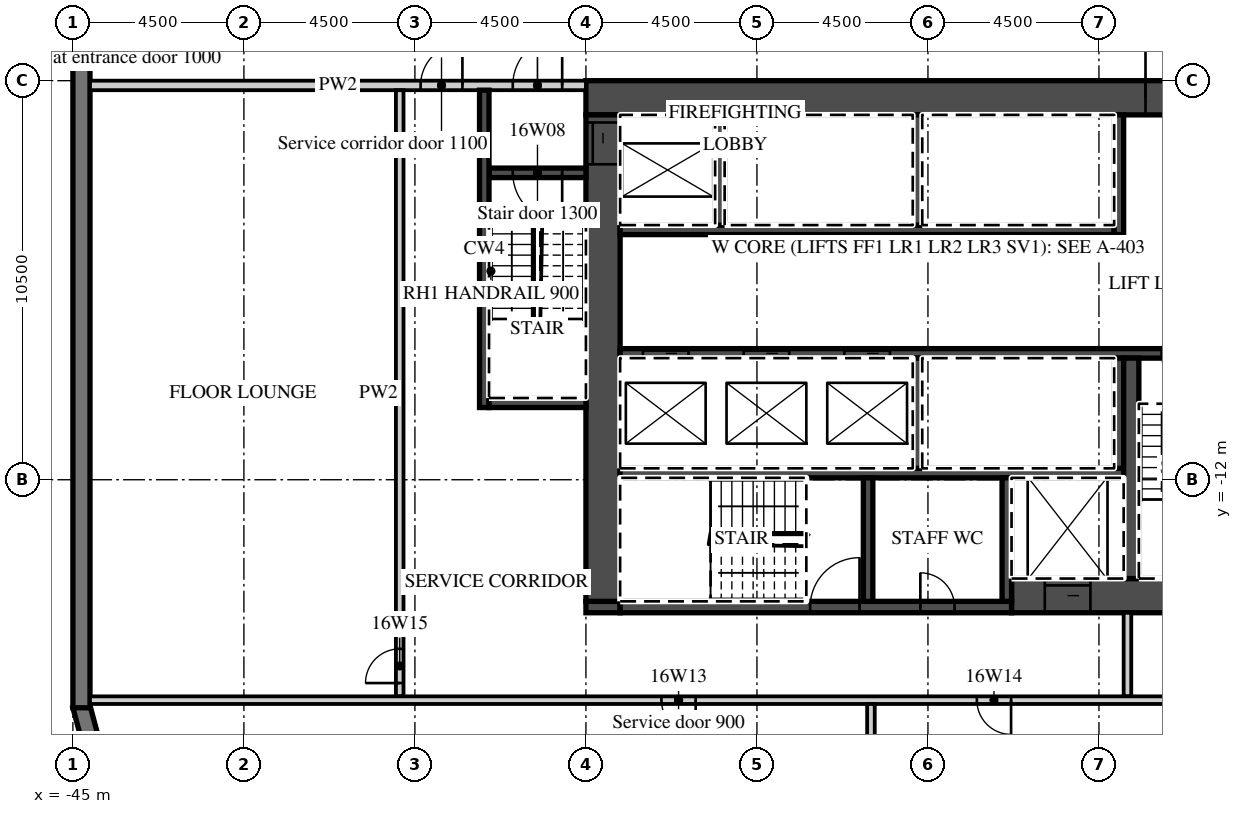
"""IFC4 building model, lengths in metres.
Left out: names, types, materials, properties, quantities, classifications, styles, units other than length and angle.
Written with IfcOpenShell. Run it as: python <this file> out.ifc"""

import sys

from ifc_helpers import new_model, si_unit, direction, frame, frame_2d, origin, place, context, subcontext, project, spatial, polyline, rectangle, outline, extrude, element, fill, save


model = new_model("IFC4")
c1 = context("Model", 3, precision=1e-05, world=origin(), true_north=direction((0.0, 1.0)))
c2 = subcontext(c1, "Body", "Model", "MODEL_VIEW")
j1 = project(units=[si_unit("LENGTHUNIT", "METRE"), si_unit("PLANEANGLEUNIT", "RADIAN")], contexts=[c1])
p1 = place(None, origin())
s1 = spatial("IfcSite", under=j1, at=p1, CompositionType="ELEMENT")
p2 = place(p1, origin())
s2 = spatial("IfcBuilding", under=s1, at=p2, CompositionType="ELEMENT")
p3 = place(p2, frame((0.0, 0.0, 83.1)))
s3 = spatial("IfcBuildingStorey", under=s2, at=p3, CompositionType="ELEMENT", Elevation=83.1)
p4 = place(p3, frame((-44.783, -17.942, 0.0), z_axis=(0.0, 0.0, 1.0), x_axis=(0.25881466832, -0.965926999034, 0.0)))
e1 = element("IfcWall", 1, at=p4, inside=s3, PredefinedType="SOLIDWALL", context=c2, shape_type="SweptSolid", body=[
    extrude(outline(polyline([(0.0, -0.225), (2.071, -0.225), (1.95, 0.225), (0.121, 0.225), (0.0, -0.225)])), origin(), (0.0, 0.0, 1.0), 3.02),
])
p5 = place(p3, frame((-44.775, 18.0, 0.0), z_axis=(0.0, 0.0, 1.0), x_axis=(0.0, -1.0, 0.0)))
e2 = element("IfcWall", 2, at=p5, inside=s3, PredefinedType="SOLIDWALL", context=c2, shape_type="SweptSolid", body=[
    extrude(rectangle(XDim=36.0, YDim=0.45, at=frame_2d((18.0, 0.0))), origin(), (0.0, 0.0, 1.0), 3.02),
])
p6 = place(p5, frame((3.9, 0.0, 0.45)))
e3 = element("IfcOpeningElement", 3, at=p6, cuts=e2, PredefinedType="OPENING", context=c2, shape_type="SweptSolid", body=[
    extrude(rectangle(XDim=3.3, YDim=2.25, at=frame_2d((1.65, 1.125))), frame((0.0, 0.235, 0.0), z_axis=(0.0, -1.0, 0.0), x_axis=(1.0, 0.0, 0.0)), (0.0, 0.0, 1.0), 0.47),
])
p7 = place(p5, frame((8.4, 0.0, 0.45)))
e4 = element("IfcOpeningElement", 4, at=p7, cuts=e2, PredefinedType="OPENING", context=c2, shape_type="SweptSolid", body=[
    extrude(rectangle(XDim=3.3, YDim=2.25, at=frame_2d((1.65, 1.125))), frame((0.0, 0.235, 0.0), z_axis=(0.0, -1.0, 0.0), x_axis=(1.0, 0.0, 0.0)), (0.0, 0.0, 1.0), 0.47),
])
p8 = place(p5, frame((12.9, 0.0, 0.45)))
e5 = element("IfcOpeningElement", 5, at=p8, cuts=e2, PredefinedType="OPENING", context=c2, shape_type="SweptSolid", body=[
    extrude(rectangle(XDim=3.3, YDim=2.25, at=frame_2d((1.65, 1.125))), frame((0.0, 0.235, 0.0), z_axis=(0.0, -1.0, 0.0), x_axis=(1.0, 0.0, 0.0)), (0.0, 0.0, 1.0), 0.47),
])
p9 = place(p3, frame((-31.5, -1.95, 0.0), z_axis=(0.0, 0.0, 1.0), x_axis=(1.0, 0.0, 0.0)))
e6 = element("IfcWall", 6, at=p9, inside=s3, PredefinedType="SHEAR", context=c2, shape_type="SweptSolid", body=[
    extrude(rectangle(XDim=18.0, YDim=0.9, at=frame_2d((9.0, 0.0))), origin(), (0.0, 0.0, 1.0), 3.02),
])
p10 = place(p9, frame((14.725, 0.0, 0.0)))
e7 = element("IfcOpeningElement", 7, at=p10, cuts=e6, PredefinedType="OPENING", context=c2, shape_type="SweptSolid", body=[
    extrude(rectangle(XDim=1.8, YDim=2.1, at=frame_2d((0.9, 1.05))), frame((0.0, 0.46, 0.0), z_axis=(0.0, -1.0, 0.0), x_axis=(1.0, 0.0, 0.0)), (0.0, 0.0, 1.0), 0.92),
])
p11 = place(p3, frame((-20.3, -15.05, 0.0), z_axis=(0.0, 0.0, 1.0), x_axis=(1.0, 0.0, 0.0)))
e8 = element("IfcWall", 8, at=p11, inside=s3, PredefinedType="SHEAR", context=c2, shape_type="SweptSolid", body=[
    extrude(rectangle(XDim=6.8, YDim=0.9, at=frame_2d((3.4, 0.0))), origin(), (0.0, 0.0, 1.0), 3.02),
])
p12 = place(p11, frame((0.875, 0.0, 0.0)))
e9 = element("IfcOpeningElement", 9, at=p12, cuts=e8, PredefinedType="OPENING", context=c2, shape_type="SweptSolid", body=[
    extrude(rectangle(XDim=1.2, YDim=2.1, at=frame_2d((0.6, 1.05))), frame((0.0, 0.46, 0.0), z_axis=(0.0, -1.0, 0.0), x_axis=(1.0, 0.0, 0.0)), (0.0, 0.0, 1.0), 0.92),
])
p13 = place(p3, frame((-31.5, -15.35, 0.0), z_axis=(0.0, 0.0, 1.0), x_axis=(1.0, 0.0, 0.0)))
e10 = element("IfcWall", 10, at=p13, inside=s3, PredefinedType="SHEAR", context=c2, shape_type="SweptSolid", body=[
    extrude(rectangle(XDim=0.9, YDim=0.3, at=frame_2d((0.45, 0.0))), origin(), (0.0, 0.0, 1.0), 3.02),
])
p14 = place(p3, frame((-30.6, -15.35, 0.0), z_axis=(0.0, 0.0, 1.0), x_axis=(1.0, 0.0, 0.0)))
e11 = element("IfcWall", 11, at=p14, inside=s3, PredefinedType="SHEAR", context=c2, shape_type="SweptSolid", body=[
    extrude(rectangle(XDim=10.3, YDim=0.3, at=frame_2d((5.15, 0.0))), origin(), (0.0, 0.0, 1.0), 3.02),
])
p15 = place(p14, frame((5.0, 0.0, 0.0)))
e12 = element("IfcOpeningElement", 12, at=p15, cuts=e11, PredefinedType="OPENING", context=c2, shape_type="SweptSolid", body=[
    extrude(rectangle(XDim=1.3, YDim=2.1, at=frame_2d((0.65, 1.05))), frame((0.0, 0.16, 0.0), z_axis=(0.0, -1.0, 0.0), x_axis=(1.0, 0.0, 0.0)), (0.0, 0.0, 1.0), 0.32),
])
p16 = place(p14, frame((7.9, 0.0, 0.0)))
e13 = element("IfcOpeningElement", 13, at=p16, cuts=e11, PredefinedType="OPENING", context=c2, shape_type="SweptSolid", body=[
    extrude(rectangle(XDim=0.9, YDim=2.1, at=frame_2d((0.45, 1.05))), frame((0.0, 0.16, 0.0), z_axis=(0.0, -1.0, 0.0), x_axis=(1.0, 0.0, 0.0)), (0.0, 0.0, 1.0), 0.32),
])
p17 = place(p3, frame((-31.05, -15.2, 0.0), z_axis=(0.0, 0.0, 1.0), x_axis=(0.0, 1.0, 0.0)))
e14 = element("IfcWall", 14, at=p17, inside=s3, PredefinedType="SHEAR", context=c2, shape_type="SweptSolid", body=[
    extrude(rectangle(XDim=12.8, YDim=0.9, at=frame_2d((6.4, 0.0))), origin(), (0.0, 0.0, 1.0), 3.02),
])
p18 = place(p17, frame((11.5, 0.0, 0.0)))
e15 = element("IfcOpeningElement", 15, at=p18, cuts=e14, PredefinedType="OPENING", context=c2, shape_type="SweptSolid", body=[
    extrude(rectangle(XDim=1.1, YDim=2.1, at=frame_2d((0.55, 1.05))), frame((0.0, 0.46, 0.0), z_axis=(0.0, -1.0, 0.0), x_axis=(1.0, 0.0, 0.0)), (0.0, 0.0, 1.0), 0.92),
])
p19 = place(p3, frame((-30.6, -5.425, 0.0), z_axis=(0.0, 0.0, 1.0), x_axis=(1.0, 0.0, 0.0)))
e16 = element("IfcWall", 16, at=p19, inside=s3, PredefinedType="SHEAR", context=c2, shape_type="SweptSolid", body=[
    extrude(rectangle(XDim=13.0, YDim=0.25, at=frame_2d((6.5, 0.0))), origin(), (0.0, 0.0, 1.0), 3.02),
])
p20 = place(p3, frame((-17.475, -5.55, 0.0), z_axis=(0.0, 0.0, 1.0), x_axis=(0.0, 1.0, 0.0)))
e17 = element("IfcWall", 17, at=p20, inside=s3, PredefinedType="SHEAR", context=c2, shape_type="SweptSolid", body=[
    extrude(rectangle(XDim=3.15, YDim=0.25, at=frame_2d((1.575, 0.0))), origin(), (0.0, 0.0, 1.0), 3.02),
])
for number, where, z_axis, x_axis in (
    (18, (-27.975, -5.3, 0.0), (0.0, 0.0, 1.0), (0.0, 1.0, 0.0)),
    (19, (-22.775, -5.3, 0.0), (0.0, 0.0, 1.0), (0.0, 1.0, 0.0)),
):
    element("IfcWall", number, at=place(p3, frame(where, z_axis=z_axis, x_axis=x_axis)), inside=s3, PredefinedType="SHEAR", context=c2, shape_type="SweptSolid", body=[
        extrude(rectangle(XDim=2.9, YDim=0.25, at=frame_2d((1.45, 0.0))), origin(), (0.0, 0.0, 1.0), 3.02),
    ])
p21 = place(p3, frame((-30.6, -8.675, 0.0), z_axis=(0.0, 0.0, 1.0), x_axis=(1.0, 0.0, 0.0)))
e20 = element("IfcWall", 20, at=p21, inside=s3, PredefinedType="SHEAR", context=c2, shape_type="SweptSolid", body=[
    extrude(rectangle(XDim=16.2, YDim=0.25, at=frame_2d((8.1, 0.0))), origin(), (0.0, 0.0, 1.0), 3.02),
])
p22 = place(p21, frame((0.6, 0.0, 0.0)))
e21 = element("IfcOpeningElement", 21, at=p22, cuts=e20, PredefinedType="OPENING", context=c2, shape_type="SweptSolid", body=[
    extrude(rectangle(XDim=1.2, YDim=2.1, at=frame_2d((0.6, 1.05))), frame((0.0, 0.135, 0.0), z_axis=(0.0, -1.0, 0.0), x_axis=(1.0, 0.0, 0.0)), (0.0, 0.0, 1.0), 0.27),
])
p23 = place(p21, frame((3.25, 0.0, 0.0)))
e22 = element("IfcOpeningElement", 22, at=p23, cuts=e20, PredefinedType="OPENING", context=c2, shape_type="SweptSolid", body=[
    extrude(rectangle(XDim=1.2, YDim=2.1, at=frame_2d((0.6, 1.05))), frame((0.0, 0.135, 0.0), z_axis=(0.0, -1.0, 0.0), x_axis=(1.0, 0.0, 0.0)), (0.0, 0.0, 1.0), 0.27),
])
p24 = place(p21, frame((5.9, 0.0, 0.0)))
e23 = element("IfcOpeningElement", 23, at=p24, cuts=e20, PredefinedType="OPENING", context=c2, shape_type="SweptSolid", body=[
    extrude(rectangle(XDim=1.2, YDim=2.1, at=frame_2d((0.6, 1.05))), frame((0.0, 0.135, 0.0), z_axis=(0.0, -1.0, 0.0), x_axis=(1.0, 0.0, 0.0)), (0.0, 0.0, 1.0), 0.27),
])
p25 = place(p21, frame((14.25, 0.0, 0.0)))
e24 = element("IfcOpeningElement", 24, at=p25, cuts=e20, PredefinedType="OPENING", context=c2, shape_type="SweptSolid", body=[
    extrude(rectangle(XDim=1.3, YDim=2.1, at=frame_2d((0.65, 1.05))), frame((0.0, 0.135, 0.0), z_axis=(0.0, -1.0, 0.0), x_axis=(1.0, 0.0, 0.0)), (0.0, 0.0, 1.0), 0.27),
])
p26 = place(p3, frame((-30.6, -11.825, 0.0), z_axis=(0.0, 0.0, 1.0), x_axis=(1.0, 0.0, 0.0)))
e25 = element("IfcWall", 25, at=p26, inside=s3, PredefinedType="SHEAR", context=c2, shape_type="SweptSolid", body=[
    extrude(rectangle(XDim=13.25, YDim=0.25, at=frame_2d((6.625, 0.0))), origin(), (0.0, 0.0, 1.0), 3.02),
])
for number, where, z_axis, x_axis in (
    (26, (-17.475, -11.7, 0.0), (0.0, 0.0, 1.0), (0.0, 1.0, 0.0)),
    (27, (-22.775, -11.7, 0.0), (0.0, 0.0, 1.0), (0.0, 1.0, 0.0)),
):
    element("IfcWall", number, at=place(p3, frame(where, z_axis=z_axis, x_axis=x_axis)), inside=s3, PredefinedType="SHEAR", context=c2, shape_type="SweptSolid", body=[
        extrude(rectangle(XDim=2.9, YDim=0.25, at=frame_2d((1.45, 0.0))), origin(), (0.0, 0.0, 1.0), 3.02),
    ])
p27 = place(p3, frame((-17.15, -14.6, 0.0), z_axis=(0.0, 0.0, 1.0), x_axis=(0.0, 1.0, 0.0)))
e28 = element("IfcWall", 28, at=p27, inside=s3, PredefinedType="SHEAR", context=c2, shape_type="SweptSolid", body=[
    extrude(rectangle(XDim=5.8, YDim=0.4, at=frame_2d((2.9, 0.0))), origin(), (0.0, 0.0, 1.0), 3.02),
])
for number, where, z_axis, x_axis in (
    (29, (-20.425, -15.2, 0.0), (0.0, 0.0, 1.0), (0.0, 1.0, 0.0)),
    (30, (-24.075, -15.2, 0.0), (0.0, 0.0, 1.0), (0.0, 1.0, 0.0)),
):
    element("IfcWall", number, at=place(p3, frame(where, z_axis=z_axis, x_axis=x_axis)), inside=s3, PredefinedType="SHEAR", context=c2, shape_type="SweptSolid", body=[
        extrude(rectangle(XDim=3.25, YDim=0.25, at=frame_2d((1.625, 0.0))), origin(), (0.0, 0.0, 1.0), 3.02),
    ])
p28 = place(p3, frame((-44.55, -1.625, 0.0), z_axis=(0.0, 0.0, 1.0), x_axis=(1.0, 0.0, 0.0)))
e31 = element("IfcWall", 31, at=p28, inside=s3, PredefinedType="PARTITIONING", context=c2, shape_type="SweptSolid", body=[
    extrude(rectangle(XDim=13.05, YDim=0.25, at=frame_2d((6.525, 0.0))), origin(), (0.0, 0.0, 1.0), 3.02),
])
p29 = place(p28, frame((11.125, 0.0, 0.0)))
e32 = element("IfcOpeningElement", 32, at=p29, cuts=e31, PredefinedType="OPENING", context=c2, shape_type="SweptSolid", body=[
    extrude(rectangle(XDim=1.3, YDim=2.1, at=frame_2d((0.65, 1.05))), frame((0.0, 0.135, 0.0), z_axis=(0.0, -1.0, 0.0), x_axis=(1.0, 0.0, 0.0)), (0.0, 0.0, 1.0), 0.27),
])
p30 = place(p28, frame((8.7, 0.0, 0.0)))
e33 = element("IfcOpeningElement", 33, at=p30, cuts=e31, PredefinedType="OPENING", context=c2, shape_type="SweptSolid", body=[
    extrude(rectangle(XDim=1.1, YDim=2.1, at=frame_2d((0.55, 1.05))), frame((0.0, 0.135, 0.0), z_axis=(0.0, -1.0, 0.0), x_axis=(1.0, 0.0, 0.0)), (0.0, 0.0, 1.0), 0.27),
])
p31 = place(p3, frame((-34.05, -3.925, 0.0), z_axis=(0.0, 0.0, 1.0), x_axis=(1.0, 0.0, 0.0)))
e34 = element("IfcWall", 34, at=p31, inside=s3, PredefinedType="SHEAR", context=c2, shape_type="SweptSolid", body=[
    extrude(rectangle(XDim=2.55, YDim=0.25, at=frame_2d((1.275, 0.0))), origin(), (0.0, 0.0, 1.0), 3.02),
])
p32 = place(p31, frame((0.625, 0.0, 0.0)))
e35 = element("IfcOpeningElement", 35, at=p32, cuts=e34, PredefinedType="OPENING", context=c2, shape_type="SweptSolid", body=[
    extrude(rectangle(XDim=1.3, YDim=2.1, at=frame_2d((0.65, 1.05))), frame((0.0, 0.135, 0.0), z_axis=(0.0, -1.0, 0.0), x_axis=(1.0, 0.0, 0.0)), (0.0, 0.0, 1.0), 0.27),
])
p33 = place(p3, frame((-34.175, -10.1, 0.0), z_axis=(0.0, 0.0, 1.0), x_axis=(0.0, 1.0, 0.0)))
e36 = element("IfcWall", 36, at=p33, inside=s3, PredefinedType="SHEAR", context=c2, shape_type="SweptSolid", body=[
    extrude(rectangle(XDim=8.35, YDim=0.25, at=frame_2d((4.175, 0.0))), origin(), (0.0, 0.0, 1.0), 3.02),
])
p34 = place(p3, frame((-34.05, -9.975, 0.0), z_axis=(0.0, 0.0, 1.0), x_axis=(1.0, 0.0, 0.0)))
e37 = element("IfcWall", 37, at=p34, inside=s3, PredefinedType="SHEAR", context=c2, shape_type="SweptSolid", body=[
    extrude(rectangle(XDim=2.55, YDim=0.25, at=frame_2d((1.275, 0.0))), origin(), (0.0, 0.0, 1.0), 3.02),
])
p35 = place(p3, frame((-17.25, -17.7, 0.0), z_axis=(0.0, 0.0, 1.0), x_axis=(0.0, 1.0, 0.0)))
e38 = element("IfcWall", 38, at=p35, inside=s3, PredefinedType="PARTITIONING", context=c2, shape_type="SweptSolid", body=[
    extrude(rectangle(XDim=2.2, YDim=0.2, at=frame_2d((1.1, 0.0))), origin(), (0.0, 0.0, 1.0), 3.02),
])
p36 = place(p3, frame((-36.4, -17.7, 0.0), z_axis=(0.0, 0.0, 1.0), x_axis=(0.0, 1.0, 0.0)))
e39 = element("IfcWall", 39, at=p36, inside=s3, PredefinedType="PARTITIONING", context=c2, shape_type="SweptSolid", body=[
    extrude(rectangle(XDim=15.95, YDim=0.2, at=frame_2d((7.975, 0.0))), origin(), (0.0, 0.0, 1.0), 3.02),
])
p37 = place(p36, frame((0.35, 0.0, 0.0)))
e40 = element("IfcOpeningElement", 40, at=p37, cuts=e39, PredefinedType="OPENING", context=c2, shape_type="SweptSolid", body=[
    extrude(rectangle(XDim=0.9, YDim=2.1, at=frame_2d((0.45, 1.05))), frame((0.0, 0.11, 0.0), z_axis=(0.0, -1.0, 0.0), x_axis=(1.0, 0.0, 0.0)), (0.0, 0.0, 1.0), 0.22),
])
p38 = place(p3, frame((-44.55, -17.8, 0.0), z_axis=(0.0, 0.0, 1.0), x_axis=(1.0, 0.0, 0.0)))
e41 = element("IfcWall", 41, at=p38, inside=s3, PredefinedType="PARTITIONING", context=c2, shape_type="SweptSolid", body=[
    extrude(rectangle(XDim=30.95, YDim=0.2, at=frame_2d((15.475, 0.0))), origin(), (0.0, 0.0, 1.0), 3.02),
])
p39 = place(p38, frame((15.038, 0.0, 0.0)))
e42 = element("IfcOpeningElement", 42, at=p39, cuts=e41, PredefinedType="OPENING", context=c2, shape_type="SweptSolid", body=[
    extrude(rectangle(XDim=0.9, YDim=2.1, at=frame_2d((0.45, 1.05))), frame((0.0, 0.11, 0.0), z_axis=(0.0, -1.0, 0.0), x_axis=(1.0, 0.0, 0.0)), (0.0, 0.0, 1.0), 0.22),
])
p40 = place(p38, frame((23.337, 0.0, 0.0)))
e43 = element("IfcOpeningElement", 43, at=p40, cuts=e41, PredefinedType="OPENING", context=c2, shape_type="SweptSolid", body=[
    extrude(rectangle(XDim=0.9, YDim=2.1, at=frame_2d((0.45, 1.05))), frame((0.0, 0.11, 0.0), z_axis=(0.0, -1.0, 0.0), x_axis=(1.0, 0.0, 0.0)), (0.0, 0.0, 1.0), 0.22),
])
p41 = place(p3, frame((-24.0, -21.55, 0.0), z_axis=(0.0, 0.0, 1.0), x_axis=(0.0, 1.0, 0.0)))
e44 = element("IfcWall", 44, at=p41, inside=s3, PredefinedType="PARTITIONING", context=c2, shape_type="SweptSolid", body=[
    extrude(rectangle(XDim=3.65, YDim=0.2, at=frame_2d((1.825, 0.0))), origin(), (0.0, 0.0, 1.0), 3.02),
])
p42 = place(p22, origin())
e45 = element("IfcDoor", 45, at=p42, inside=s3, OperationType="SLIDING_TO_LEFT", PredefinedType="DOOR", context=c2, shape_type="SweptSolid", body=[
    extrude(rectangle(XDim=1.2, YDim=2.1, at=frame_2d((0.6, 1.05))), frame((0.0, 0.025, 0.0), z_axis=(0.0, -1.0, 0.0), x_axis=(1.0, 0.0, 0.0)), (0.0, 0.0, 1.0), 0.05),
])
fill(e21, e45)
p43 = place(p23, origin())
e46 = element("IfcDoor", 46, at=p43, inside=s3, OperationType="SLIDING_TO_RIGHT", PredefinedType="DOOR", context=c2, shape_type="SweptSolid", body=[
    extrude(rectangle(XDim=1.2, YDim=2.1, at=frame_2d((0.6, 1.05))), frame((0.0, 0.025, 0.0), z_axis=(0.0, -1.0, 0.0), x_axis=(1.0, 0.0, 0.0)), (0.0, 0.0, 1.0), 0.05),
])
fill(e22, e46)
p44 = place(p24, origin())
e47 = element("IfcDoor", 47, at=p44, inside=s3, OperationType="SLIDING_TO_RIGHT", PredefinedType="DOOR", context=c2, shape_type="SweptSolid", body=[
    extrude(rectangle(XDim=1.2, YDim=2.1, at=frame_2d((0.6, 1.05))), frame((0.0, 0.025, 0.0), z_axis=(0.0, -1.0, 0.0), x_axis=(1.0, 0.0, 0.0)), (0.0, 0.0, 1.0), 0.05),
])
fill(e23, e47)
p45 = place(p12, origin())
e48 = element("IfcDoor", 48, at=p45, inside=s3, OperationType="SLIDING_TO_LEFT", PredefinedType="DOOR", context=c2, shape_type="SweptSolid", body=[
    extrude(rectangle(XDim=1.2, YDim=2.1, at=frame_2d((0.6, 1.05))), frame((0.0, 0.025, 0.0), z_axis=(0.0, -1.0, 0.0), x_axis=(1.0, 0.0, 0.0)), (0.0, 0.0, 1.0), 0.05),
])
fill(e9, e48)
p46 = place(p18, origin())
e49 = element("IfcDoor", 49, at=p46, inside=s3, OperationType="SLIDING_TO_RIGHT", PredefinedType="DOOR", context=c2, shape_type="SweptSolid", body=[
    extrude(rectangle(XDim=1.1, YDim=2.1, at=frame_2d((0.55, 1.05))), frame((0.0, 0.025, 0.0), z_axis=(0.0, -1.0, 0.0), x_axis=(1.0, 0.0, 0.0)), (0.0, 0.0, 1.0), 0.05),
])
fill(e15, e49)
p47 = place(p10, origin())
e50 = element("IfcDoor", 50, at=p47, inside=s3, OperationType="DOUBLE_DOOR_DOUBLE_SWING", PredefinedType="DOOR", context=c2, shape_type="SweptSolid", body=[
    extrude(rectangle(XDim=1.8, YDim=2.1, at=frame_2d((0.9, 1.05))), frame((0.0, 0.025, 0.0), z_axis=(0.0, -1.0, 0.0), x_axis=(1.0, 0.0, 0.0)), (0.0, 0.0, 1.0), 0.05),
])
fill(e7, e50)
p48 = place(p29, origin())
e51 = element("IfcDoor", 51, at=p48, inside=s3, OperationType="SINGLE_SWING_RIGHT", PredefinedType="DOOR", context=c2, shape_type="SweptSolid", body=[
    extrude(rectangle(XDim=1.3, YDim=2.1, at=frame_2d((0.65, 1.05))), frame((0.0, 0.025, 0.0), z_axis=(0.0, -1.0, 0.0), x_axis=(1.0, 0.0, 0.0)), (0.0, 0.0, 1.0), 0.05),
])
fill(e32, e51)
p49 = place(p32, origin())
e52 = element("IfcDoor", 52, at=p49, inside=s3, OperationType="SINGLE_SWING_RIGHT", PredefinedType="DOOR", context=c2, shape_type="SweptSolid", body=[
    extrude(rectangle(XDim=1.3, YDim=2.1, at=frame_2d((0.65, 1.05))), frame((0.0, 0.025, 0.0), z_axis=(0.0, -1.0, 0.0), x_axis=(1.0, 0.0, 0.0)), (0.0, 0.0, 1.0), 0.05),
])
fill(e35, e52)
p50 = place(p30, origin())
e53 = element("IfcDoor", 53, at=p50, inside=s3, OperationType="SINGLE_SWING_RIGHT", PredefinedType="DOOR", context=c2, shape_type="SweptSolid", body=[
    extrude(rectangle(XDim=1.1, YDim=2.1, at=frame_2d((0.55, 1.05))), frame((0.0, 0.025, 0.0), z_axis=(0.0, -1.0, 0.0), x_axis=(1.0, 0.0, 0.0)), (0.0, 0.0, 1.0), 0.05),
])
fill(e33, e53)
p51 = place(p25, origin())
e54 = element("IfcDoor", 54, at=p51, inside=s3, OperationType="SINGLE_SWING_RIGHT", PredefinedType="DOOR", context=c2, shape_type="SweptSolid", body=[
    extrude(rectangle(XDim=1.3, YDim=2.1, at=frame_2d((0.65, 1.05))), frame((0.0, 0.025, 0.0), z_axis=(0.0, -1.0, 0.0), x_axis=(1.0, 0.0, 0.0)), (0.0, 0.0, 1.0), 0.05),
])
fill(e24, e54)
p52 = place(p15, origin())
e55 = element("IfcDoor", 55, at=p52, inside=s3, OperationType="SINGLE_SWING_RIGHT", PredefinedType="DOOR", context=c2, shape_type="SweptSolid", body=[
    extrude(rectangle(XDim=1.3, YDim=2.1, at=frame_2d((0.65, 1.05))), frame((0.0, 0.025, 0.0), z_axis=(0.0, -1.0, 0.0), x_axis=(1.0, 0.0, 0.0)), (0.0, 0.0, 1.0), 0.05),
])
fill(e12, e55)
p53 = place(p16, origin())
e56 = element("IfcDoor", 56, at=p53, inside=s3, OperationType="SINGLE_SWING_LEFT", PredefinedType="DOOR", context=c2, shape_type="SweptSolid", body=[
    extrude(rectangle(XDim=0.9, YDim=2.1, at=frame_2d((0.45, 1.05))), frame((0.0, 0.025, 0.0), z_axis=(0.0, -1.0, 0.0), x_axis=(1.0, 0.0, 0.0)), (0.0, 0.0, 1.0), 0.05),
])
fill(e13, e56)
p54 = place(p39, origin())
e57 = element("IfcDoor", 57, at=p54, inside=s3, OperationType="SINGLE_SWING_RIGHT", PredefinedType="DOOR", context=c2, shape_type="SweptSolid", body=[
    extrude(rectangle(XDim=0.9, YDim=2.1, at=frame_2d((0.45, 1.05))), frame((0.0, 0.025, 0.0), z_axis=(0.0, -1.0, 0.0), x_axis=(1.0, 0.0, 0.0)), (0.0, 0.0, 1.0), 0.05),
])
fill(e42, e57)
p55 = place(p40, origin())
e58 = element("IfcDoor", 58, at=p55, inside=s3, OperationType="SINGLE_SWING_RIGHT", PredefinedType="DOOR", context=c2, shape_type="SweptSolid", body=[
    extrude(rectangle(XDim=0.9, YDim=2.1, at=frame_2d((0.45, 1.05))), frame((0.0, 0.025, 0.0), z_axis=(0.0, -1.0, 0.0), x_axis=(1.0, 0.0, 0.0)), (0.0, 0.0, 1.0), 0.05),
])
fill(e43, e58)
p56 = place(p37, origin())
e59 = element("IfcDoor", 59, at=p56, inside=s3, OperationType="SINGLE_SWING_LEFT", PredefinedType="DOOR", context=c2, shape_type="SweptSolid", body=[
    extrude(rectangle(XDim=0.9, YDim=2.1, at=frame_2d((0.45, 1.05))), frame((0.0, 0.025, 0.0), z_axis=(0.0, -1.0, 0.0), x_axis=(1.0, 0.0, 0.0)), (0.0, 0.0, 1.0), 0.05),
])
fill(e40, e59)
save(model, sys.argv[1])
